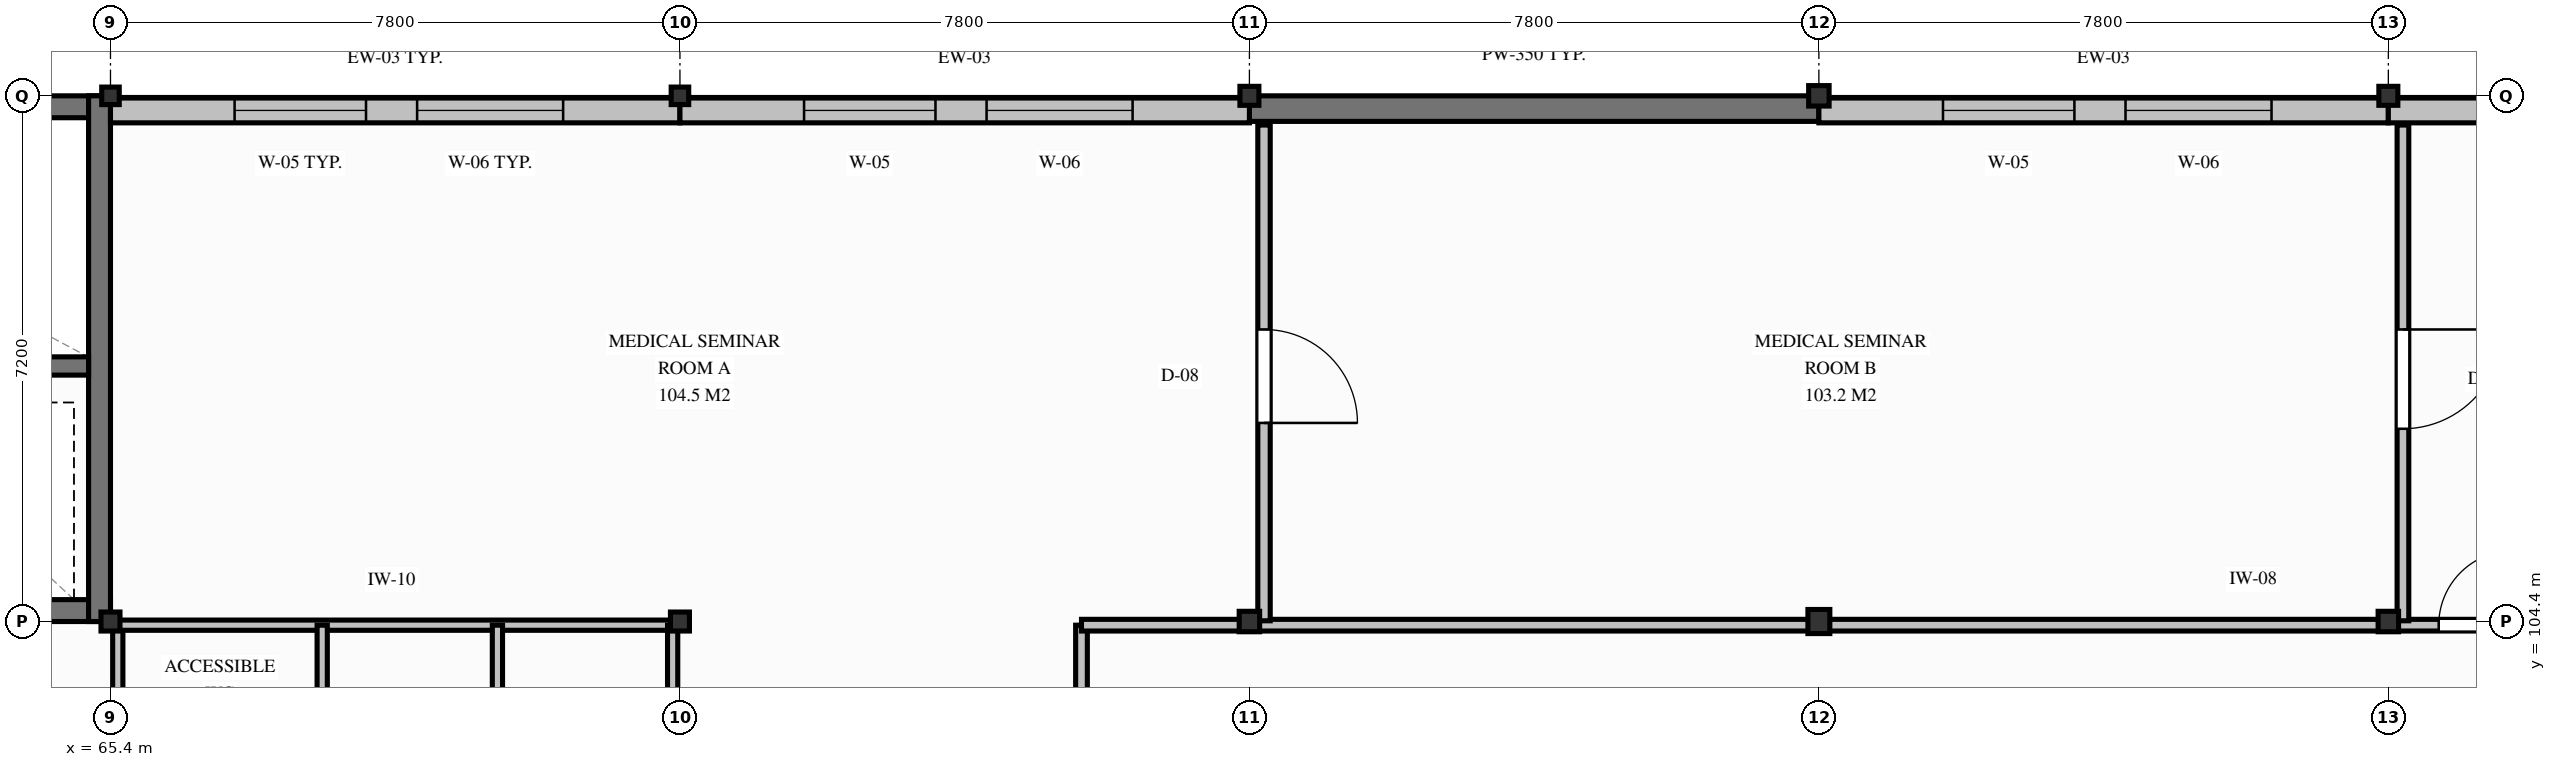
"""IFC4 building model, lengths in metres.
Left out: names, types, materials, properties, quantities, classifications, styles, units other than length and angle.
Written with IfcOpenShell. Run it as: python <this file> out.ifc"""

import sys

from ifc_helpers import new_model, si_unit, direction, frame, frame_2d, origin, origin_2d, place, context, subcontext, project, spatial, rectangle, i_section, extrude, element, fill, save


model = new_model("IFC4")
c1 = context("Model", 3, precision=1e-05, world=origin(), true_north=direction((0.0, 1.0)))
c2 = subcontext(c1, "Body", "Model", "MODEL_VIEW")
j1 = project(units=[si_unit("LENGTHUNIT", "METRE"), si_unit("PLANEANGLEUNIT", "RADIAN")], contexts=[c1])
p1 = place(None, origin())
s1 = spatial("IfcSite", under=j1, at=p1, CompositionType="ELEMENT")
p2 = place(p1, origin())
s2 = spatial("IfcBuilding", under=s1, at=p2, CompositionType="ELEMENT")
p3 = place(p2, frame((0.0, 0.0, 21.3)))
s3 = spatial("IfcBuildingStorey", under=s2, at=p3, CompositionType="ELEMENT", Elevation=21.3)
p4 = place(p3, frame((57.0, 111.45, 0.0), z_axis=(0.0, 0.0, 1.0), x_axis=(1.0, 0.0, 0.0)))
e1 = element("IfcWall", 1, at=p4, inside=s3, PredefinedType="SHEAR", context=c2, shape_type="SweptSolid", body=[
    extrude(rectangle(XDim=8.4, YDim=0.3, at=frame_2d((4.2, 0.0))), origin(), (0.0, 0.0, 1.0), 4.05),
])
p5 = place(p3, frame((57.0, 104.55, 0.0), z_axis=(0.0, 0.0, 1.0), x_axis=(1.0, 0.0, 0.0)))
e2 = element("IfcWall", 2, at=p5, inside=s3, PredefinedType="SHEAR", context=c2, shape_type="SweptSolid", body=[
    extrude(rectangle(XDim=8.4, YDim=0.3, at=frame_2d((4.2, 0.0))), origin(), (0.0, 0.0, 1.0), 4.05),
])
p6 = place(p5, frame((2.8, 0.0, 0.0)))
e3 = element("IfcOpeningElement", 3, at=p6, cuts=e2, PredefinedType="OPENING", context=c2, shape_type="SweptSolid", body=[
    extrude(rectangle(XDim=1.0, YDim=2.1, at=frame_2d((0.5, 1.05))), frame((0.0, 0.16, 0.0), z_axis=(0.0, -1.0, 0.0), x_axis=(1.0, 0.0, 0.0)), (0.0, 0.0, 1.0), 0.32),
])
p7 = place(p5, frame((5.85, 0.0, 0.0)))
e4 = element("IfcOpeningElement", 4, at=p7, cuts=e2, PredefinedType="OPENING", context=c2, shape_type="SweptSolid", body=[
    extrude(rectangle(XDim=1.2, YDim=2.15, at=frame_2d((0.6, 1.075))), frame((0.0, 0.16, 0.0), z_axis=(0.0, -1.0, 0.0), x_axis=(1.0, 0.0, 0.0)), (0.0, 0.0, 1.0), 0.32),
])
p8 = place(p3, frame((65.25, 104.4, 0.0), z_axis=(0.0, 0.0, 1.0), x_axis=(0.0, 1.0, 0.0)))
e5 = element("IfcWall", 5, at=p8, inside=s3, PredefinedType="SHEAR", context=c2, shape_type="SweptSolid", body=[
    extrude(rectangle(XDim=7.2, YDim=0.3, at=frame_2d((3.6, 0.0))), origin(), (0.0, 0.0, 1.0), 4.05),
])
p9 = place(p3, frame((57.3, 107.9, 0.0), z_axis=(0.0, 0.0, 1.0), x_axis=(1.0, 0.0, 0.0)))
e6 = element("IfcWall", 6, at=p9, inside=s3, PredefinedType="SHEAR", context=c2, shape_type="SweptSolid", body=[
    extrude(rectangle(XDim=7.8, YDim=0.25, at=frame_2d((3.9, 0.0))), origin(), (0.0, 0.0, 1.0), 4.05),
])
p10 = place(p3, frame((81.0, 111.425, 0.0), z_axis=(0.0, 0.0, 1.0), x_axis=(1.0, 0.0, 0.0)))
e7 = element("IfcWall", 7, at=p10, inside=s3, PredefinedType="SHEAR", context=c2, shape_type="SweptSolid", body=[
    extrude(rectangle(XDim=7.8, YDim=0.35, at=frame_2d((3.9, 0.0))), origin(), (0.0, 0.0, 1.0), 4.05),
])
p11 = place(p3, frame((65.4, 104.4, 0.0), z_axis=(0.0, 0.0, 1.0), x_axis=(1.0, 0.0, 0.0)))
e8 = element("IfcColumn", 8, at=p11, inside=s3, PredefinedType="COLUMN", context=c2, shape_type="SweptSolid", body=[
    extrude(i_section(OverallWidth=0.26, OverallDepth=0.26, WebThickness=0.01, FlangeThickness=0.018, FilletRadius=0.024, at=origin_2d()), origin(), (0.0, 0.0, 1.0), 4.05),
])
p12 = place(p3, frame((65.4, 111.6, 0.0), z_axis=(0.0, 0.0, 1.0), x_axis=(1.0, 0.0, 0.0)))
e9 = element("IfcColumn", 9, at=p12, inside=s3, PredefinedType="COLUMN", context=c2, shape_type="SweptSolid", body=[
    extrude(i_section(OverallWidth=0.24, OverallDepth=0.24, WebThickness=0.01, FlangeThickness=0.017, FilletRadius=0.021, at=origin_2d()), origin(), (0.0, 0.0, 1.0), 4.05),
])
p13 = place(p3, frame((73.2, 104.4, 0.0), z_axis=(0.0, 0.0, 1.0), x_axis=(1.0, 0.0, 0.0)))
e10 = element("IfcColumn", 10, at=p13, inside=s3, PredefinedType="COLUMN", context=c2, shape_type="SweptSolid", body=[
    extrude(i_section(OverallWidth=0.26, OverallDepth=0.26, WebThickness=0.01, FlangeThickness=0.018, FilletRadius=0.024, at=origin_2d()), origin(), (0.0, 0.0, 1.0), 4.05),
])
p14 = place(p3, frame((73.2, 111.6, 0.0), z_axis=(0.0, 0.0, 1.0), x_axis=(1.0, 0.0, 0.0)))
e11 = element("IfcColumn", 11, at=p14, inside=s3, PredefinedType="COLUMN", context=c2, shape_type="SweptSolid", body=[
    extrude(i_section(OverallWidth=0.24, OverallDepth=0.24, WebThickness=0.01, FlangeThickness=0.017, FilletRadius=0.021, at=origin_2d()), origin(), (0.0, 0.0, 1.0), 4.05),
])
p15 = place(p3, frame((81.0, 104.4, 0.0), z_axis=(0.0, 0.0, 1.0), x_axis=(1.0, 0.0, 0.0)))
e12 = element("IfcColumn", 12, at=p15, inside=s3, PredefinedType="COLUMN", context=c2, shape_type="SweptSolid", body=[
    extrude(i_section(OverallWidth=0.28, OverallDepth=0.28, WebThickness=0.01, FlangeThickness=0.018, FilletRadius=0.024, at=origin_2d()), origin(), (0.0, 0.0, 1.0), 4.05),
])
p16 = place(p3, frame((81.0, 111.6, 0.0), z_axis=(0.0, 0.0, 1.0), x_axis=(1.0, 0.0, 0.0)))
e13 = element("IfcColumn", 13, at=p16, inside=s3, PredefinedType="COLUMN", context=c2, shape_type="SweptSolid", body=[
    extrude(i_section(OverallWidth=0.26, OverallDepth=0.26, WebThickness=0.01, FlangeThickness=0.018, FilletRadius=0.024, at=origin_2d()), origin(), (0.0, 0.0, 1.0), 4.05),
])
p17 = place(p3, frame((88.8, 104.4, 0.0), z_axis=(0.0, 0.0, 1.0), x_axis=(1.0, 0.0, 0.0)))
e14 = element("IfcColumn", 14, at=p17, inside=s3, PredefinedType="COLUMN", context=c2, shape_type="SweptSolid", body=[
    extrude(i_section(OverallWidth=0.3, OverallDepth=0.33, WebThickness=0.01, FlangeThickness=0.017, FilletRadius=0.027, at=origin_2d()), origin(), (0.0, 0.0, 1.0), 4.05),
])
for number, where, z_axis, x_axis in (
    (15, (88.8, 111.6, 0.0), (0.0, 0.0, 1.0), (1.0, 0.0, 0.0)),
    (16, (96.6, 104.4, 0.0), (0.0, 0.0, 1.0), (1.0, 0.0, 0.0)),
):
    element("IfcColumn", number, at=place(p3, frame(where, z_axis=z_axis, x_axis=x_axis)), inside=s3, PredefinedType="COLUMN", context=c2, shape_type="SweptSolid", body=[
        extrude(i_section(OverallWidth=0.28, OverallDepth=0.28, WebThickness=0.01, FlangeThickness=0.018, FilletRadius=0.024, at=origin_2d()), origin(), (0.0, 0.0, 1.0), 4.05),
    ])
p18 = place(p3, frame((96.6, 111.6, 0.0), z_axis=(0.0, 0.0, 1.0), x_axis=(1.0, 0.0, 0.0)))
e17 = element("IfcColumn", 17, at=p18, inside=s3, PredefinedType="COLUMN", context=c2, shape_type="SweptSolid", body=[
    extrude(i_section(OverallWidth=0.26, OverallDepth=0.26, WebThickness=0.01, FlangeThickness=0.018, FilletRadius=0.024, at=origin_2d()), origin(), (0.0, 0.0, 1.0), 4.05),
])
p19 = place(p3, frame((65.4, 111.4, 0.0), z_axis=(0.0, 0.0, 1.0), x_axis=(1.0, 0.0, 0.0)))
e18 = element("IfcWall", 18, at=p19, inside=s3, PredefinedType="SOLIDWALL", context=c2, shape_type="SweptSolid", body=[
    extrude(rectangle(XDim=7.8, YDim=0.34, at=frame_2d((3.9, 0.0))), origin(), (0.0, 0.0, 1.0), 3.478),
])
p20 = place(p19, frame((1.7, 0.0, 0.85)))
e19 = element("IfcOpeningElement", 19, at=p20, cuts=e18, PredefinedType="OPENING", context=c2, shape_type="SweptSolid", body=[
    extrude(rectangle(XDim=1.8, YDim=1.95, at=frame_2d((0.9, 0.975))), frame((0.0, 0.18, 0.0), z_axis=(0.0, -1.0, 0.0), x_axis=(1.0, 0.0, 0.0)), (0.0, 0.0, 1.0), 0.36),
])
p21 = place(p19, frame((4.2, 0.0, 0.85)))
e20 = element("IfcOpeningElement", 20, at=p21, cuts=e18, PredefinedType="OPENING", context=c2, shape_type="SweptSolid", body=[
    extrude(rectangle(XDim=2.0, YDim=1.95, at=frame_2d((1.0, 0.975))), frame((0.0, 0.18, 0.0), z_axis=(0.0, -1.0, 0.0), x_axis=(1.0, 0.0, 0.0)), (0.0, 0.0, 1.0), 0.36),
])
p22 = place(p3, frame((73.2, 111.4, 0.0), z_axis=(0.0, 0.0, 1.0), x_axis=(1.0, 0.0, 0.0)))
e21 = element("IfcWall", 21, at=p22, inside=s3, PredefinedType="SOLIDWALL", context=c2, shape_type="SweptSolid", body=[
    extrude(rectangle(XDim=7.8, YDim=0.34, at=frame_2d((3.9, 0.0))), origin(), (0.0, 0.0, 1.0), 3.228),
])
p23 = place(p22, frame((1.7, 0.0, 0.85)))
e22 = element("IfcOpeningElement", 22, at=p23, cuts=e21, PredefinedType="OPENING", context=c2, shape_type="SweptSolid", body=[
    extrude(rectangle(XDim=1.8, YDim=1.95, at=frame_2d((0.9, 0.975))), frame((0.0, 0.18, 0.0), z_axis=(0.0, -1.0, 0.0), x_axis=(1.0, 0.0, 0.0)), (0.0, 0.0, 1.0), 0.36),
])
p24 = place(p22, frame((4.2, 0.0, 0.85)))
e23 = element("IfcOpeningElement", 23, at=p24, cuts=e21, PredefinedType="OPENING", context=c2, shape_type="SweptSolid", body=[
    extrude(rectangle(XDim=2.0, YDim=1.95, at=frame_2d((1.0, 0.975))), frame((0.0, 0.18, 0.0), z_axis=(0.0, -1.0, 0.0), x_axis=(1.0, 0.0, 0.0)), (0.0, 0.0, 1.0), 0.36),
])
p25 = place(p3, frame((88.8, 111.4, 0.0), z_axis=(0.0, 0.0, 1.0), x_axis=(1.0, 0.0, 0.0)))
e24 = element("IfcWall", 24, at=p25, inside=s3, PredefinedType="SOLIDWALL", context=c2, shape_type="SweptSolid", body=[
    extrude(rectangle(XDim=7.8, YDim=0.34, at=frame_2d((3.9, 0.0))), origin(), (0.0, 0.0, 1.0), 3.178),
])
p26 = place(p25, frame((1.7, 0.0, 0.85)))
e25 = element("IfcOpeningElement", 25, at=p26, cuts=e24, PredefinedType="OPENING", context=c2, shape_type="SweptSolid", body=[
    extrude(rectangle(XDim=1.8, YDim=1.95, at=frame_2d((0.9, 0.975))), frame((0.0, 0.18, 0.0), z_axis=(0.0, -1.0, 0.0), x_axis=(1.0, 0.0, 0.0)), (0.0, 0.0, 1.0), 0.36),
])
p27 = place(p25, frame((4.2, 0.0, 0.85)))
e26 = element("IfcOpeningElement", 26, at=p27, cuts=e24, PredefinedType="OPENING", context=c2, shape_type="SweptSolid", body=[
    extrude(rectangle(XDim=2.0, YDim=1.95, at=frame_2d((1.0, 0.975))), frame((0.0, 0.18, 0.0), z_axis=(0.0, -1.0, 0.0), x_axis=(1.0, 0.0, 0.0)), (0.0, 0.0, 1.0), 0.36),
])
p28 = place(p3, frame((96.6, 111.4, 0.0), z_axis=(0.0, 0.0, 1.0), x_axis=(1.0, 0.0, 0.0)))
e27 = element("IfcWall", 27, at=p28, inside=s3, PredefinedType="SOLIDWALL", context=c2, shape_type="SweptSolid", body=[
    extrude(rectangle(XDim=8.4, YDim=0.34, at=frame_2d((4.2, 0.0))), origin(), (0.0, 0.0, 1.0), 3.328),
])
p29 = place(p28, frame((1.9, 0.0, 0.85)))
e28 = element("IfcOpeningElement", 28, at=p29, cuts=e27, PredefinedType="OPENING", context=c2, shape_type="SweptSolid", body=[
    extrude(rectangle(XDim=1.8, YDim=1.95, at=frame_2d((0.9, 0.975))), frame((0.0, 0.18, 0.0), z_axis=(0.0, -1.0, 0.0), x_axis=(1.0, 0.0, 0.0)), (0.0, 0.0, 1.0), 0.36),
])
p30 = place(p28, frame((4.6, 0.0, 0.85)))
e29 = element("IfcOpeningElement", 29, at=p30, cuts=e27, PredefinedType="OPENING", context=c2, shape_type="SweptSolid", body=[
    extrude(rectangle(XDim=2.0, YDim=1.95, at=frame_2d((1.0, 0.975))), frame((0.0, 0.18, 0.0), z_axis=(0.0, -1.0, 0.0), x_axis=(1.0, 0.0, 0.0)), (0.0, 0.0, 1.0), 0.36),
])
p31 = place(p3, frame((65.5, 100.7, 0.0), z_axis=(0.0, 0.0, 1.0), x_axis=(0.0, 1.0, 0.0)))
e30 = element("IfcWall", 30, at=p31, inside=s3, PredefinedType="PARTITIONING", context=c2, shape_type="SweptSolid", body=[
    extrude(rectangle(XDim=3.68, YDim=0.14, at=frame_2d((1.84, 0.0))), origin(), (0.0, 0.0, 1.0), 3.438),
])
p32 = place(p3, frame((65.4, 104.35, 0.0), z_axis=(0.0, 0.0, 1.0), x_axis=(1.0, 0.0, 0.0)))
e31 = element("IfcWall", 31, at=p32, inside=s3, PredefinedType="PARTITIONING", context=c2, shape_type="SweptSolid", body=[
    extrude(rectangle(XDim=7.7, YDim=0.14, at=frame_2d((3.85, 0.0))), origin(), (0.0, 0.0, 1.0), 3.438),
])
for number, where, z_axis, x_axis in (
    (32, (73.1, 100.7, 0.0), (0.0, 0.0, 1.0), (0.0, 1.0, 0.0)),
    (33, (68.3, 100.7, 0.0), (0.0, 0.0, 1.0), (0.0, 1.0, 0.0)),
    (34, (70.7, 100.7, 0.0), (0.0, 0.0, 1.0), (0.0, 1.0, 0.0)),
):
    element("IfcWall", number, at=place(p3, frame(where, z_axis=z_axis, x_axis=x_axis)), inside=s3, PredefinedType="PARTITIONING", context=c2, shape_type="SweptSolid", body=[
        extrude(rectangle(XDim=3.65, YDim=0.14, at=frame_2d((1.825, 0.0))), origin(), (0.0, 0.0, 1.0), 3.448),
    ])
p33 = place(p3, frame((78.7, 100.7, 0.0), z_axis=(0.0, 0.0, 1.0), x_axis=(0.0, 1.0, 0.0)))
e35 = element("IfcWall", 35, at=p33, inside=s3, PredefinedType="PARTITIONING", context=c2, shape_type="SweptSolid", body=[
    extrude(rectangle(XDim=3.65, YDim=0.16, at=frame_2d((1.825, 0.0))), origin(), (0.0, 0.0, 1.0), 3.568),
])
p34 = place(p3, frame((78.7, 104.35, 0.0), z_axis=(0.0, 0.0, 1.0), x_axis=(1.0, 0.0, 0.0)))
e36 = element("IfcWall", 36, at=p34, inside=s3, PredefinedType="PARTITIONING", context=c2, shape_type="SweptSolid", body=[
    extrude(rectangle(XDim=36.2, YDim=0.16, at=frame_2d((18.1, 0.0))), origin(), (0.0, 0.0, 1.0), 3.178),
])
p35 = place(p34, frame((18.59, 0.0, 0.0)))
e37 = element("IfcOpeningElement", 37, at=p35, cuts=e36, PredefinedType="OPENING", context=c2, shape_type="SweptSolid", body=[
    extrude(rectangle(XDim=1.02, YDim=2.15, at=frame_2d((0.51, 1.075))), frame((0.0, 0.09, 0.0), z_axis=(0.0, -1.0, 0.0), x_axis=(1.0, 0.0, 0.0)), (0.0, 0.0, 1.0), 0.18),
])
p36 = place(p3, frame((81.2, 111.2, 0.0), z_axis=(0.0, 0.0, 1.0), x_axis=(0.0, -1.0, 0.0)))
e38 = element("IfcWall", 38, at=p36, inside=s3, PredefinedType="PARTITIONING", context=c2, shape_type="SweptSolid", body=[
    extrude(rectangle(XDim=6.79, YDim=0.17, at=frame_2d((3.395, 0.0))), origin(), (0.0, 0.0, 1.0), 3.228),
])
p37 = place(p36, frame((2.8, 0.0, 0.0)))
e39 = element("IfcOpeningElement", 39, at=p37, cuts=e38, PredefinedType="OPENING", context=c2, shape_type="SweptSolid", body=[
    extrude(rectangle(XDim=1.28, YDim=2.22, at=frame_2d((0.64, 1.11))), frame((0.0, 0.095, 0.0), z_axis=(0.0, -1.0, 0.0), x_axis=(1.0, 0.0, 0.0)), (0.0, 0.0, 1.0), 0.19),
])
p38 = place(p3, frame((96.8, 111.2, 0.0), z_axis=(0.0, 0.0, 1.0), x_axis=(0.0, -1.0, 0.0)))
e40 = element("IfcWall", 40, at=p38, inside=s3, PredefinedType="PARTITIONING", context=c2, shape_type="SweptSolid", body=[
    extrude(rectangle(XDim=6.79, YDim=0.16, at=frame_2d((3.395, 0.0))), origin(), (0.0, 0.0, 1.0), 3.328),
])
p39 = place(p38, frame((2.8, 0.0, 0.0)))
e41 = element("IfcOpeningElement", 41, at=p39, cuts=e40, PredefinedType="OPENING", context=c2, shape_type="SweptSolid", body=[
    extrude(rectangle(XDim=1.36, YDim=2.2, at=frame_2d((0.68, 1.1))), frame((0.0, 0.09, 0.0), z_axis=(0.0, -1.0, 0.0), x_axis=(1.0, 0.0, 0.0)), (0.0, 0.0, 1.0), 0.18),
])
p40 = place(p20, origin())
e42 = element("IfcWindow", 42, at=p40, inside=s3, PartitioningType="SINGLE_PANEL", PredefinedType="WINDOW", context=c2, shape_type="SweptSolid", body=[
    extrude(rectangle(XDim=1.8, YDim=1.95, at=frame_2d((0.9, 0.975))), frame((0.0, 0.03, 0.0), z_axis=(0.0, -1.0, 0.0), x_axis=(1.0, 0.0, 0.0)), (0.0, 0.0, 1.0), 0.06),
])
fill(e19, e42)
p41 = place(p21, origin())
e43 = element("IfcWindow", 43, at=p41, inside=s3, PartitioningType="SINGLE_PANEL", PredefinedType="WINDOW", context=c2, shape_type="SweptSolid", body=[
    extrude(rectangle(XDim=2.0, YDim=1.95, at=frame_2d((1.0, 0.975))), frame((0.0, 0.03, 0.0), z_axis=(0.0, -1.0, 0.0), x_axis=(1.0, 0.0, 0.0)), (0.0, 0.0, 1.0), 0.06),
])
fill(e20, e43)
p42 = place(p23, origin())
e44 = element("IfcWindow", 44, at=p42, inside=s3, PartitioningType="SINGLE_PANEL", PredefinedType="WINDOW", context=c2, shape_type="SweptSolid", body=[
    extrude(rectangle(XDim=1.8, YDim=1.95, at=frame_2d((0.9, 0.975))), frame((0.0, 0.03, 0.0), z_axis=(0.0, -1.0, 0.0), x_axis=(1.0, 0.0, 0.0)), (0.0, 0.0, 1.0), 0.06),
])
fill(e22, e44)
p43 = place(p24, origin())
e45 = element("IfcWindow", 45, at=p43, inside=s3, PartitioningType="SINGLE_PANEL", PredefinedType="WINDOW", context=c2, shape_type="SweptSolid", body=[
    extrude(rectangle(XDim=2.0, YDim=1.95, at=frame_2d((1.0, 0.975))), frame((0.0, 0.03, 0.0), z_axis=(0.0, -1.0, 0.0), x_axis=(1.0, 0.0, 0.0)), (0.0, 0.0, 1.0), 0.06),
])
fill(e23, e45)
p44 = place(p26, origin())
e46 = element("IfcWindow", 46, at=p44, inside=s3, PartitioningType="SINGLE_PANEL", PredefinedType="WINDOW", context=c2, shape_type="SweptSolid", body=[
    extrude(rectangle(XDim=1.8, YDim=1.95, at=frame_2d((0.9, 0.975))), frame((0.0, 0.03, 0.0), z_axis=(0.0, -1.0, 0.0), x_axis=(1.0, 0.0, 0.0)), (0.0, 0.0, 1.0), 0.06),
])
fill(e25, e46)
p45 = place(p27, origin())
e47 = element("IfcWindow", 47, at=p45, inside=s3, PartitioningType="SINGLE_PANEL", PredefinedType="WINDOW", context=c2, shape_type="SweptSolid", body=[
    extrude(rectangle(XDim=2.0, YDim=1.95, at=frame_2d((1.0, 0.975))), frame((0.0, 0.03, 0.0), z_axis=(0.0, -1.0, 0.0), x_axis=(1.0, 0.0, 0.0)), (0.0, 0.0, 1.0), 0.06),
])
fill(e26, e47)
p46 = place(p37, origin())
e48 = element("IfcDoor", 48, at=p46, inside=s3, OperationType="SINGLE_SWING_RIGHT", PredefinedType="DOOR", context=c2, shape_type="SweptSolid", body=[
    extrude(rectangle(XDim=1.28, YDim=2.22, at=frame_2d((0.64, 1.11))), frame((0.0, 0.025, 0.0), z_axis=(0.0, -1.0, 0.0), x_axis=(1.0, 0.0, 0.0)), (0.0, 0.0, 1.0), 0.05),
])
fill(e39, e48)
p47 = place(p39, origin())
e49 = element("IfcDoor", 49, at=p47, inside=s3, OperationType="SINGLE_SWING_LEFT", PredefinedType="DOOR", context=c2, shape_type="SweptSolid", body=[
    extrude(rectangle(XDim=1.36, YDim=2.2, at=frame_2d((0.68, 1.1))), frame((0.0, 0.025, 0.0), z_axis=(0.0, -1.0, 0.0), x_axis=(1.0, 0.0, 0.0)), (0.0, 0.0, 1.0), 0.05),
])
fill(e41, e49)
p48 = place(p35, origin())
e50 = element("IfcDoor", 50, at=p48, inside=s3, OperationType="SINGLE_SWING_RIGHT", PredefinedType="DOOR", context=c2, shape_type="SweptSolid", body=[
    extrude(rectangle(XDim=1.02, YDim=2.15, at=frame_2d((0.51, 1.075))), frame((0.0, 0.025, 0.0), z_axis=(0.0, -1.0, 0.0), x_axis=(1.0, 0.0, 0.0)), (0.0, 0.0, 1.0), 0.05),
])
fill(e37, e50)
save(model, sys.argv[1])
